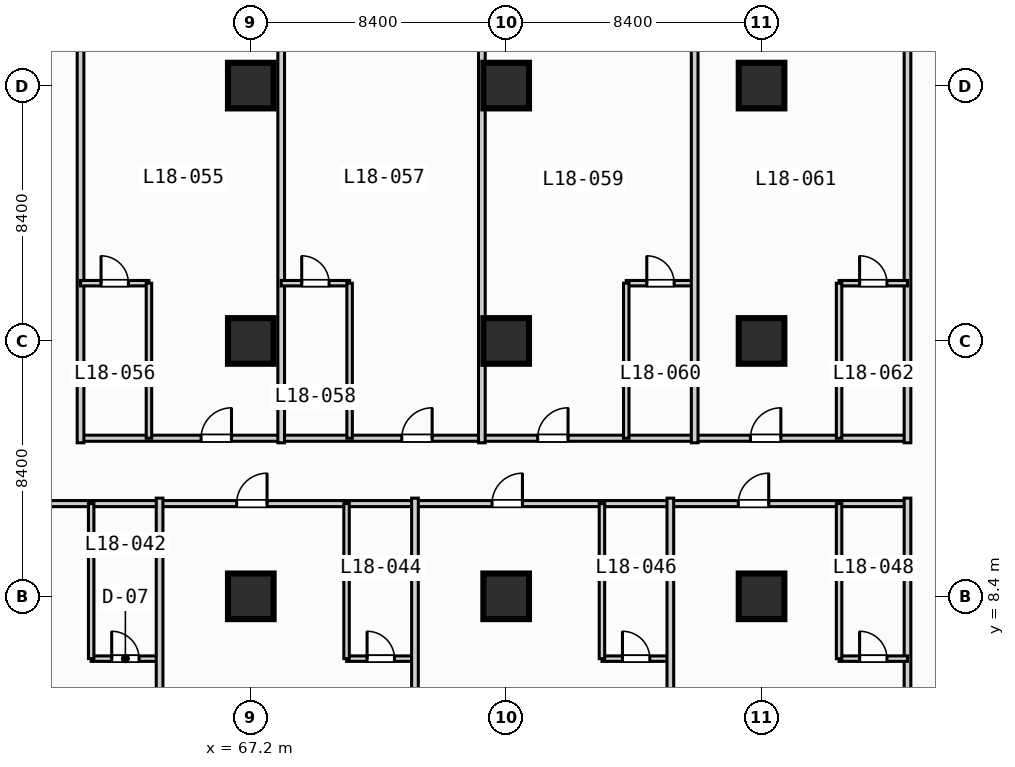
"""IFC4 building model, lengths in metres.
Left out: names, types, materials, properties, quantities, classifications, styles, units other than length and angle.
Written with IfcOpenShell. Run it as: python <this file> out.ifc"""

import sys

from ifc_helpers import new_model, si_unit, direction, frame, frame_2d, origin, origin_2d, place, context, subcontext, project, spatial, rectangle, extrude, element, fill, save


model = new_model("IFC4")
c1 = context("Model", 3, precision=1e-05, world=origin(), true_north=direction((0.0, 1.0)))
c2 = subcontext(c1, "Body", "Model", "MODEL_VIEW")
j1 = project(units=[si_unit("LENGTHUNIT", "METRE"), si_unit("PLANEANGLEUNIT", "RADIAN")], contexts=[c1])
p1 = place(None, origin())
s1 = spatial("IfcSite", under=j1, at=p1, CompositionType="ELEMENT")
p2 = place(p1, origin())
s2 = spatial("IfcBuilding", under=s1, at=p2, CompositionType="ELEMENT")
p3 = place(p2, frame((0.0, 0.0, 77.6)))
s3 = spatial("IfcBuildingStorey", under=s2, at=p3, CompositionType="ELEMENT", Elevation=77.6)
for number, where, z_axis, x_axis in (
    (1, (67.2, 8.4, 0.0), (0.0, 0.0, 1.0), (1.0, 0.0, 0.0)),
    (2, (67.2, 16.8, 0.0), (0.0, 0.0, 1.0), (1.0, 0.0, 0.0)),
    (3, (67.2, 25.2, 0.0), (0.0, 0.0, 1.0), (1.0, 0.0, 0.0)),
    (4, (75.6, 8.4, 0.0), (0.0, 0.0, 1.0), (1.0, 0.0, 0.0)),
    (5, (75.6, 16.8, 0.0), (0.0, 0.0, 1.0), (1.0, 0.0, 0.0)),
    (6, (75.6, 25.2, 0.0), (0.0, 0.0, 1.0), (1.0, 0.0, 0.0)),
    (7, (84.0, 8.4, 0.0), (0.0, 0.0, 1.0), (1.0, 0.0, 0.0)),
    (8, (84.0, 16.8, 0.0), (0.0, 0.0, 1.0), (1.0, 0.0, 0.0)),
    (9, (84.0, 25.2, 0.0), (0.0, 0.0, 1.0), (1.0, 0.0, 0.0)),
):
    element("IfcColumn", number, at=place(p3, frame(where, z_axis=z_axis, x_axis=x_axis)), inside=s3, PredefinedType="COLUMN", context=c2, shape_type="SweptSolid", body=[
        extrude(rectangle(XDim=1.5, YDim=1.5, at=origin_2d()), origin(), (0.0, 0.0, 1.0), 3.8),
    ])
p4 = place(p3, frame((55.8, 11.45, 0.0), z_axis=(0.0, 0.0, 1.0), x_axis=(1.0, 0.0, 0.0)))
e10 = element("IfcWall", 10, at=p4, inside=s3, PredefinedType="PARTITIONING", context=c2, shape_type="SweptSolid", body=[
    extrude(rectangle(XDim=33.0, YDim=0.2, at=frame_2d((16.5, 0.0))), origin(), (0.0, 0.0, 1.0), 3.55),
])
p5 = place(p4, frame((2.535, 0.0, 0.0)))
e11 = element("IfcOpeningElement", 11, at=p5, cuts=e10, PredefinedType="OPENING", context=c2, shape_type="SweptSolid", body=[
    extrude(rectangle(XDim=1.0, YDim=2.15, at=frame_2d((0.5, 1.075))), frame((0.0, 0.11, 0.0), z_axis=(0.0, -1.0, 0.0), x_axis=(1.0, 0.0, 0.0)), (0.0, 0.0, 1.0), 0.22),
])
p6 = place(p4, frame((10.935, 0.0, 0.0)))
e12 = element("IfcOpeningElement", 12, at=p6, cuts=e10, PredefinedType="OPENING", context=c2, shape_type="SweptSolid", body=[
    extrude(rectangle(XDim=1.0, YDim=2.15, at=frame_2d((0.5, 1.075))), frame((0.0, 0.11, 0.0), z_axis=(0.0, -1.0, 0.0), x_axis=(1.0, 0.0, 0.0)), (0.0, 0.0, 1.0), 0.22),
])
p7 = place(p4, frame((19.335, 0.0, 0.0)))
e13 = element("IfcOpeningElement", 13, at=p7, cuts=e10, PredefinedType="OPENING", context=c2, shape_type="SweptSolid", body=[
    extrude(rectangle(XDim=1.0, YDim=2.15, at=frame_2d((0.5, 1.075))), frame((0.0, 0.11, 0.0), z_axis=(0.0, -1.0, 0.0), x_axis=(1.0, 0.0, 0.0)), (0.0, 0.0, 1.0), 0.22),
])
p8 = place(p4, frame((27.435, 0.0, 0.0)))
e14 = element("IfcOpeningElement", 14, at=p8, cuts=e10, PredefinedType="OPENING", context=c2, shape_type="SweptSolid", body=[
    extrude(rectangle(XDim=1.0, YDim=2.15, at=frame_2d((0.5, 1.075))), frame((0.0, 0.11, 0.0), z_axis=(0.0, -1.0, 0.0), x_axis=(1.0, 0.0, 0.0)), (0.0, 0.0, 1.0), 0.22),
])
p9 = place(p3, frame((61.95, 6.35, 0.0), z_axis=(0.0, 0.0, 1.0), x_axis=(1.0, 0.0, 0.0)))
e15 = element("IfcWall", 15, at=p9, inside=s3, PredefinedType="PLUMBINGWALL", context=c2, shape_type="SweptSolid", body=[
    extrude(rectangle(XDim=2.25, YDim=0.18, at=frame_2d((1.125, 0.0))), origin(), (0.0, 0.0, 1.0), 3.55),
])
p10 = place(p9, frame((0.675, 0.0, 0.0)))
e16 = element("IfcOpeningElement", 16, at=p10, cuts=e15, PredefinedType="OPENING", context=c2, shape_type="SweptSolid", body=[
    extrude(rectangle(XDim=0.9, YDim=2.1, at=frame_2d((0.45, 1.05))), frame((0.0, 0.1, 0.0), z_axis=(0.0, -1.0, 0.0), x_axis=(1.0, 0.0, 0.0)), (0.0, 0.0, 1.0), 0.2),
])
p11 = place(p3, frame((61.95, 6.35, 0.0), z_axis=(0.0, 0.0, 1.0), x_axis=(0.0, 1.0, 0.0)))
e17 = element("IfcWall", 17, at=p11, inside=s3, PredefinedType="PLUMBINGWALL", context=c2, shape_type="SweptSolid", body=[
    extrude(rectangle(XDim=5.1, YDim=0.18, at=frame_2d((2.55, 0.0))), origin(), (0.0, 0.0, 1.0), 3.55),
])
p12 = place(p3, frame((64.2, 0.2, 0.0), z_axis=(0.0, 0.0, 1.0), x_axis=(0.0, 1.0, 0.0)))
e18 = element("IfcWall", 18, at=p12, inside=s3, PredefinedType="PARTITIONING", context=c2, shape_type="SweptSolid", body=[
    extrude(rectangle(XDim=11.43, YDim=0.22, at=frame_2d((5.715, 0.0))), origin(), (0.0, 0.0, 1.0), 3.55),
])
p13 = place(p3, frame((70.35, 6.35, 0.0), z_axis=(0.0, 0.0, 1.0), x_axis=(1.0, 0.0, 0.0)))
e19 = element("IfcWall", 19, at=p13, inside=s3, PredefinedType="PLUMBINGWALL", context=c2, shape_type="SweptSolid", body=[
    extrude(rectangle(XDim=2.25, YDim=0.18, at=frame_2d((1.125, 0.0))), origin(), (0.0, 0.0, 1.0), 3.55),
])
p14 = place(p13, frame((0.675, 0.0, 0.0)))
e20 = element("IfcOpeningElement", 20, at=p14, cuts=e19, PredefinedType="OPENING", context=c2, shape_type="SweptSolid", body=[
    extrude(rectangle(XDim=0.9, YDim=2.1, at=frame_2d((0.45, 1.05))), frame((0.0, 0.1, 0.0), z_axis=(0.0, -1.0, 0.0), x_axis=(1.0, 0.0, 0.0)), (0.0, 0.0, 1.0), 0.2),
])
p15 = place(p3, frame((70.35, 6.35, 0.0), z_axis=(0.0, 0.0, 1.0), x_axis=(0.0, 1.0, 0.0)))
e21 = element("IfcWall", 21, at=p15, inside=s3, PredefinedType="PLUMBINGWALL", context=c2, shape_type="SweptSolid", body=[
    extrude(rectangle(XDim=5.1, YDim=0.18, at=frame_2d((2.55, 0.0))), origin(), (0.0, 0.0, 1.0), 3.55),
])
p16 = place(p3, frame((72.6, 0.2, 0.0), z_axis=(0.0, 0.0, 1.0), x_axis=(0.0, 1.0, 0.0)))
e22 = element("IfcWall", 22, at=p16, inside=s3, PredefinedType="PARTITIONING", context=c2, shape_type="SweptSolid", body=[
    extrude(rectangle(XDim=11.43, YDim=0.22, at=frame_2d((5.715, 0.0))), origin(), (0.0, 0.0, 1.0), 3.55),
])
p17 = place(p3, frame((78.75, 6.35, 0.0), z_axis=(0.0, 0.0, 1.0), x_axis=(1.0, 0.0, 0.0)))
e23 = element("IfcWall", 23, at=p17, inside=s3, PredefinedType="PLUMBINGWALL", context=c2, shape_type="SweptSolid", body=[
    extrude(rectangle(XDim=2.25, YDim=0.18, at=frame_2d((1.125, 0.0))), origin(), (0.0, 0.0, 1.0), 3.55),
])
p18 = place(p17, frame((0.675, 0.0, 0.0)))
e24 = element("IfcOpeningElement", 24, at=p18, cuts=e23, PredefinedType="OPENING", context=c2, shape_type="SweptSolid", body=[
    extrude(rectangle(XDim=0.9, YDim=2.1, at=frame_2d((0.45, 1.05))), frame((0.0, 0.1, 0.0), z_axis=(0.0, -1.0, 0.0), x_axis=(1.0, 0.0, 0.0)), (0.0, 0.0, 1.0), 0.2),
])
p19 = place(p3, frame((78.75, 6.35, 0.0), z_axis=(0.0, 0.0, 1.0), x_axis=(0.0, 1.0, 0.0)))
e25 = element("IfcWall", 25, at=p19, inside=s3, PredefinedType="PLUMBINGWALL", context=c2, shape_type="SweptSolid", body=[
    extrude(rectangle(XDim=5.1, YDim=0.18, at=frame_2d((2.55, 0.0))), origin(), (0.0, 0.0, 1.0), 3.55),
])
for number, where, z_axis, x_axis in (
    (26, (81.0, 0.2, 0.0), (0.0, 0.0, 1.0), (0.0, 1.0, 0.0)),
    (27, (88.8, 0.2, 0.0), (0.0, 0.0, 1.0), (0.0, 1.0, 0.0)),
):
    element("IfcWall", number, at=place(p3, frame(where, z_axis=z_axis, x_axis=x_axis)), inside=s3, PredefinedType="PARTITIONING", context=c2, shape_type="SweptSolid", body=[
        extrude(rectangle(XDim=11.43, YDim=0.22, at=frame_2d((5.715, 0.0))), origin(), (0.0, 0.0, 1.0), 3.55),
    ])
p20 = place(p3, frame((86.55, 6.35, 0.0), z_axis=(0.0, 0.0, 1.0), x_axis=(1.0, 0.0, 0.0)))
e28 = element("IfcWall", 28, at=p20, inside=s3, PredefinedType="PLUMBINGWALL", context=c2, shape_type="SweptSolid", body=[
    extrude(rectangle(XDim=2.25, YDim=0.18, at=frame_2d((1.125, 0.0))), origin(), (0.0, 0.0, 1.0), 3.55),
])
p21 = place(p20, frame((0.675, 0.0, 0.0)))
e29 = element("IfcOpeningElement", 29, at=p21, cuts=e28, PredefinedType="OPENING", context=c2, shape_type="SweptSolid", body=[
    extrude(rectangle(XDim=0.9, YDim=2.1, at=frame_2d((0.45, 1.05))), frame((0.0, 0.1, 0.0), z_axis=(0.0, -1.0, 0.0), x_axis=(1.0, 0.0, 0.0)), (0.0, 0.0, 1.0), 0.2),
])
p22 = place(p3, frame((86.55, 6.35, 0.0), z_axis=(0.0, 0.0, 1.0), x_axis=(0.0, 1.0, 0.0)))
e30 = element("IfcWall", 30, at=p22, inside=s3, PredefinedType="PLUMBINGWALL", context=c2, shape_type="SweptSolid", body=[
    extrude(rectangle(XDim=5.1, YDim=0.18, at=frame_2d((2.55, 0.0))), origin(), (0.0, 0.0, 1.0), 3.55),
])
p23 = place(p3, frame((61.6, 13.6, 0.0), z_axis=(0.0, 0.0, 1.0), x_axis=(1.0, 0.0, 0.0)))
e31 = element("IfcWall", 31, at=p23, inside=s3, PredefinedType="PARTITIONING", context=c2, shape_type="SweptSolid", body=[
    extrude(rectangle(XDim=27.2, YDim=0.2, at=frame_2d((13.6, 0.0))), origin(), (0.0, 0.0, 1.0), 3.55),
])
p24 = place(p23, frame((3.965, 0.0, 0.0)))
e32 = element("IfcOpeningElement", 32, at=p24, cuts=e31, PredefinedType="OPENING", context=c2, shape_type="SweptSolid", body=[
    extrude(rectangle(XDim=1.0, YDim=2.15, at=frame_2d((0.5, 1.075))), frame((0.0, 0.11, 0.0), z_axis=(0.0, -1.0, 0.0), x_axis=(1.0, 0.0, 0.0)), (0.0, 0.0, 1.0), 0.22),
])
p25 = place(p23, frame((10.565, 0.0, 0.0)))
e33 = element("IfcOpeningElement", 33, at=p25, cuts=e31, PredefinedType="OPENING", context=c2, shape_type="SweptSolid", body=[
    extrude(rectangle(XDim=1.0, YDim=2.15, at=frame_2d((0.5, 1.075))), frame((0.0, 0.11, 0.0), z_axis=(0.0, -1.0, 0.0), x_axis=(1.0, 0.0, 0.0)), (0.0, 0.0, 1.0), 0.22),
])
p26 = place(p23, frame((15.035, 0.0, 0.0)))
e34 = element("IfcOpeningElement", 34, at=p26, cuts=e31, PredefinedType="OPENING", context=c2, shape_type="SweptSolid", body=[
    extrude(rectangle(XDim=1.0, YDim=2.15, at=frame_2d((0.5, 1.075))), frame((0.0, 0.11, 0.0), z_axis=(0.0, -1.0, 0.0), x_axis=(1.0, 0.0, 0.0)), (0.0, 0.0, 1.0), 0.22),
])
p27 = place(p23, frame((22.035, 0.0, 0.0)))
e35 = element("IfcOpeningElement", 35, at=p27, cuts=e31, PredefinedType="OPENING", context=c2, shape_type="SweptSolid", body=[
    extrude(rectangle(XDim=1.0, YDim=2.15, at=frame_2d((0.5, 1.075))), frame((0.0, 0.11, 0.0), z_axis=(0.0, -1.0, 0.0), x_axis=(1.0, 0.0, 0.0)), (0.0, 0.0, 1.0), 0.22),
])
p28 = place(p3, frame((61.6, 13.45, 0.0), z_axis=(0.0, 0.0, 1.0), x_axis=(0.0, 1.0, 0.0)))
e36 = element("IfcWall", 36, at=p28, inside=s3, PredefinedType="PARTITIONING", context=c2, shape_type="SweptSolid", body=[
    extrude(rectangle(XDim=19.98, YDim=0.22, at=frame_2d((9.99, 0.0))), origin(), (0.0, 0.0, 1.0), 3.55),
])
p29 = place(p3, frame((61.6, 18.7, 0.0), z_axis=(0.0, 0.0, 1.0), x_axis=(1.0, 0.0, 0.0)))
e37 = element("IfcWall", 37, at=p29, inside=s3, PredefinedType="PLUMBINGWALL", context=c2, shape_type="SweptSolid", body=[
    extrude(rectangle(XDim=2.25, YDim=0.18, at=frame_2d((1.125, 0.0))), origin(), (0.0, 0.0, 1.0), 3.55),
])
p30 = place(p29, frame((0.675, 0.0, 0.0)))
e38 = element("IfcOpeningElement", 38, at=p30, cuts=e37, PredefinedType="OPENING", context=c2, shape_type="SweptSolid", body=[
    extrude(rectangle(XDim=0.9, YDim=2.1, at=frame_2d((0.45, 1.05))), frame((0.0, 0.1, 0.0), z_axis=(0.0, -1.0, 0.0), x_axis=(1.0, 0.0, 0.0)), (0.0, 0.0, 1.0), 0.2),
])
p31 = place(p3, frame((63.85, 13.6, 0.0), z_axis=(0.0, 0.0, 1.0), x_axis=(0.0, 1.0, 0.0)))
e39 = element("IfcWall", 39, at=p31, inside=s3, PredefinedType="PLUMBINGWALL", context=c2, shape_type="SweptSolid", body=[
    extrude(rectangle(XDim=5.1, YDim=0.18, at=frame_2d((2.55, 0.0))), origin(), (0.0, 0.0, 1.0), 3.55),
])
p32 = place(p3, frame((68.2, 13.45, 0.0), z_axis=(0.0, 0.0, 1.0), x_axis=(0.0, 1.0, 0.0)))
e40 = element("IfcWall", 40, at=p32, inside=s3, PredefinedType="PARTITIONING", context=c2, shape_type="SweptSolid", body=[
    extrude(rectangle(XDim=19.98, YDim=0.22, at=frame_2d((9.99, 0.0))), origin(), (0.0, 0.0, 1.0), 3.55),
])
p33 = place(p3, frame((68.2, 18.7, 0.0), z_axis=(0.0, 0.0, 1.0), x_axis=(1.0, 0.0, 0.0)))
e41 = element("IfcWall", 41, at=p33, inside=s3, PredefinedType="PLUMBINGWALL", context=c2, shape_type="SweptSolid", body=[
    extrude(rectangle(XDim=2.25, YDim=0.18, at=frame_2d((1.125, 0.0))), origin(), (0.0, 0.0, 1.0), 3.55),
])
p34 = place(p33, frame((0.675, 0.0, 0.0)))
e42 = element("IfcOpeningElement", 42, at=p34, cuts=e41, PredefinedType="OPENING", context=c2, shape_type="SweptSolid", body=[
    extrude(rectangle(XDim=0.9, YDim=2.1, at=frame_2d((0.45, 1.05))), frame((0.0, 0.1, 0.0), z_axis=(0.0, -1.0, 0.0), x_axis=(1.0, 0.0, 0.0)), (0.0, 0.0, 1.0), 0.2),
])
p35 = place(p3, frame((70.45, 13.6, 0.0), z_axis=(0.0, 0.0, 1.0), x_axis=(0.0, 1.0, 0.0)))
e43 = element("IfcWall", 43, at=p35, inside=s3, PredefinedType="PLUMBINGWALL", context=c2, shape_type="SweptSolid", body=[
    extrude(rectangle(XDim=5.1, YDim=0.18, at=frame_2d((2.55, 0.0))), origin(), (0.0, 0.0, 1.0), 3.55),
])
p36 = place(p3, frame((74.8, 13.45, 0.0), z_axis=(0.0, 0.0, 1.0), x_axis=(0.0, 1.0, 0.0)))
e44 = element("IfcWall", 44, at=p36, inside=s3, PredefinedType="PARTITIONING", context=c2, shape_type="SweptSolid", body=[
    extrude(rectangle(XDim=19.98, YDim=0.22, at=frame_2d((9.99, 0.0))), origin(), (0.0, 0.0, 1.0), 3.55),
])
p37 = place(p3, frame((79.55, 18.7, 0.0), z_axis=(0.0, 0.0, 1.0), x_axis=(1.0, 0.0, 0.0)))
e45 = element("IfcWall", 45, at=p37, inside=s3, PredefinedType="PLUMBINGWALL", context=c2, shape_type="SweptSolid", body=[
    extrude(rectangle(XDim=2.25, YDim=0.18, at=frame_2d((1.125, 0.0))), origin(), (0.0, 0.0, 1.0), 3.55),
])
p38 = place(p37, frame((0.675, 0.0, 0.0)))
e46 = element("IfcOpeningElement", 46, at=p38, cuts=e45, PredefinedType="OPENING", context=c2, shape_type="SweptSolid", body=[
    extrude(rectangle(XDim=0.9, YDim=2.1, at=frame_2d((0.45, 1.05))), frame((0.0, 0.1, 0.0), z_axis=(0.0, -1.0, 0.0), x_axis=(1.0, 0.0, 0.0)), (0.0, 0.0, 1.0), 0.2),
])
p39 = place(p3, frame((79.55, 13.6, 0.0), z_axis=(0.0, 0.0, 1.0), x_axis=(0.0, 1.0, 0.0)))
e47 = element("IfcWall", 47, at=p39, inside=s3, PredefinedType="PLUMBINGWALL", context=c2, shape_type="SweptSolid", body=[
    extrude(rectangle(XDim=5.1, YDim=0.18, at=frame_2d((2.55, 0.0))), origin(), (0.0, 0.0, 1.0), 3.55),
])
for number, where, z_axis, x_axis in (
    (48, (81.8, 13.45, 0.0), (0.0, 0.0, 1.0), (0.0, 1.0, 0.0)),
    (49, (88.8, 13.45, 0.0), (0.0, 0.0, 1.0), (0.0, 1.0, 0.0)),
):
    element("IfcWall", number, at=place(p3, frame(where, z_axis=z_axis, x_axis=x_axis)), inside=s3, PredefinedType="PARTITIONING", context=c2, shape_type="SweptSolid", body=[
        extrude(rectangle(XDim=19.98, YDim=0.22, at=frame_2d((9.99, 0.0))), origin(), (0.0, 0.0, 1.0), 3.55),
    ])
p40 = place(p3, frame((86.55, 18.7, 0.0), z_axis=(0.0, 0.0, 1.0), x_axis=(1.0, 0.0, 0.0)))
e50 = element("IfcWall", 50, at=p40, inside=s3, PredefinedType="PLUMBINGWALL", context=c2, shape_type="SweptSolid", body=[
    extrude(rectangle(XDim=2.25, YDim=0.18, at=frame_2d((1.125, 0.0))), origin(), (0.0, 0.0, 1.0), 3.55),
])
p41 = place(p40, frame((0.675, 0.0, 0.0)))
e51 = element("IfcOpeningElement", 51, at=p41, cuts=e50, PredefinedType="OPENING", context=c2, shape_type="SweptSolid", body=[
    extrude(rectangle(XDim=0.9, YDim=2.1, at=frame_2d((0.45, 1.05))), frame((0.0, 0.1, 0.0), z_axis=(0.0, -1.0, 0.0), x_axis=(1.0, 0.0, 0.0)), (0.0, 0.0, 1.0), 0.2),
])
p42 = place(p3, frame((86.55, 13.6, 0.0), z_axis=(0.0, 0.0, 1.0), x_axis=(0.0, 1.0, 0.0)))
e52 = element("IfcWall", 52, at=p42, inside=s3, PredefinedType="PLUMBINGWALL", context=c2, shape_type="SweptSolid", body=[
    extrude(rectangle(XDim=5.1, YDim=0.18, at=frame_2d((2.55, 0.0))), origin(), (0.0, 0.0, 1.0), 3.55),
])
p43 = place(p6, origin())
e53 = element("IfcDoor", 53, at=p43, inside=s3, OperationType="SINGLE_SWING_RIGHT", PredefinedType="DOOR", context=c2, shape_type="SweptSolid", body=[
    extrude(rectangle(XDim=1.0, YDim=2.15, at=frame_2d((0.5, 1.075))), frame((0.0, 0.025, 0.0), z_axis=(0.0, -1.0, 0.0), x_axis=(1.0, 0.0, 0.0)), (0.0, 0.0, 1.0), 0.05),
])
fill(e12, e53)
p44 = place(p7, origin())
e54 = element("IfcDoor", 54, at=p44, inside=s3, OperationType="SINGLE_SWING_RIGHT", PredefinedType="DOOR", context=c2, shape_type="SweptSolid", body=[
    extrude(rectangle(XDim=1.0, YDim=2.15, at=frame_2d((0.5, 1.075))), frame((0.0, 0.025, 0.0), z_axis=(0.0, -1.0, 0.0), x_axis=(1.0, 0.0, 0.0)), (0.0, 0.0, 1.0), 0.05),
])
fill(e13, e54)
p45 = place(p8, origin())
e55 = element("IfcDoor", 55, at=p45, inside=s3, OperationType="SINGLE_SWING_RIGHT", PredefinedType="DOOR", context=c2, shape_type="SweptSolid", body=[
    extrude(rectangle(XDim=1.0, YDim=2.15, at=frame_2d((0.5, 1.075))), frame((0.0, 0.025, 0.0), z_axis=(0.0, -1.0, 0.0), x_axis=(1.0, 0.0, 0.0)), (0.0, 0.0, 1.0), 0.05),
])
fill(e14, e55)
p46 = place(p10, origin())
e56 = element("IfcDoor", 56, at=p46, inside=s3, OperationType="SINGLE_SWING_LEFT", PredefinedType="DOOR", context=c2, shape_type="SweptSolid", body=[
    extrude(rectangle(XDim=0.9, YDim=2.1, at=frame_2d((0.45, 1.05))), frame((0.0, 0.025, 0.0), z_axis=(0.0, -1.0, 0.0), x_axis=(1.0, 0.0, 0.0)), (0.0, 0.0, 1.0), 0.05),
])
fill(e16, e56)
p47 = place(p14, origin())
e57 = element("IfcDoor", 57, at=p47, inside=s3, OperationType="SINGLE_SWING_LEFT", PredefinedType="DOOR", context=c2, shape_type="SweptSolid", body=[
    extrude(rectangle(XDim=0.9, YDim=2.1, at=frame_2d((0.45, 1.05))), frame((0.0, 0.025, 0.0), z_axis=(0.0, -1.0, 0.0), x_axis=(1.0, 0.0, 0.0)), (0.0, 0.0, 1.0), 0.05),
])
fill(e20, e57)
p48 = place(p18, origin())
e58 = element("IfcDoor", 58, at=p48, inside=s3, OperationType="SINGLE_SWING_LEFT", PredefinedType="DOOR", context=c2, shape_type="SweptSolid", body=[
    extrude(rectangle(XDim=0.9, YDim=2.1, at=frame_2d((0.45, 1.05))), frame((0.0, 0.025, 0.0), z_axis=(0.0, -1.0, 0.0), x_axis=(1.0, 0.0, 0.0)), (0.0, 0.0, 1.0), 0.05),
])
fill(e24, e58)
p49 = place(p21, origin())
e59 = element("IfcDoor", 59, at=p49, inside=s3, OperationType="SINGLE_SWING_LEFT", PredefinedType="DOOR", context=c2, shape_type="SweptSolid", body=[
    extrude(rectangle(XDim=0.9, YDim=2.1, at=frame_2d((0.45, 1.05))), frame((0.0, 0.025, 0.0), z_axis=(0.0, -1.0, 0.0), x_axis=(1.0, 0.0, 0.0)), (0.0, 0.0, 1.0), 0.05),
])
fill(e29, e59)
p50 = place(p24, origin())
e60 = element("IfcDoor", 60, at=p50, inside=s3, OperationType="SINGLE_SWING_RIGHT", PredefinedType="DOOR", context=c2, shape_type="SweptSolid", body=[
    extrude(rectangle(XDim=1.0, YDim=2.15, at=frame_2d((0.5, 1.075))), frame((0.0, 0.025, 0.0), z_axis=(0.0, -1.0, 0.0), x_axis=(1.0, 0.0, 0.0)), (0.0, 0.0, 1.0), 0.05),
])
fill(e32, e60)
p51 = place(p25, origin())
e61 = element("IfcDoor", 61, at=p51, inside=s3, OperationType="SINGLE_SWING_RIGHT", PredefinedType="DOOR", context=c2, shape_type="SweptSolid", body=[
    extrude(rectangle(XDim=1.0, YDim=2.15, at=frame_2d((0.5, 1.075))), frame((0.0, 0.025, 0.0), z_axis=(0.0, -1.0, 0.0), x_axis=(1.0, 0.0, 0.0)), (0.0, 0.0, 1.0), 0.05),
])
fill(e33, e61)
p52 = place(p26, origin())
e62 = element("IfcDoor", 62, at=p52, inside=s3, OperationType="SINGLE_SWING_RIGHT", PredefinedType="DOOR", context=c2, shape_type="SweptSolid", body=[
    extrude(rectangle(XDim=1.0, YDim=2.15, at=frame_2d((0.5, 1.075))), frame((0.0, 0.025, 0.0), z_axis=(0.0, -1.0, 0.0), x_axis=(1.0, 0.0, 0.0)), (0.0, 0.0, 1.0), 0.05),
])
fill(e34, e62)
p53 = place(p27, origin())
e63 = element("IfcDoor", 63, at=p53, inside=s3, OperationType="SINGLE_SWING_RIGHT", PredefinedType="DOOR", context=c2, shape_type="SweptSolid", body=[
    extrude(rectangle(XDim=1.0, YDim=2.15, at=frame_2d((0.5, 1.075))), frame((0.0, 0.025, 0.0), z_axis=(0.0, -1.0, 0.0), x_axis=(1.0, 0.0, 0.0)), (0.0, 0.0, 1.0), 0.05),
])
fill(e35, e63)
p54 = place(p30, origin())
e64 = element("IfcDoor", 64, at=p54, inside=s3, OperationType="SINGLE_SWING_LEFT", PredefinedType="DOOR", context=c2, shape_type="SweptSolid", body=[
    extrude(rectangle(XDim=0.9, YDim=2.1, at=frame_2d((0.45, 1.05))), frame((0.0, 0.025, 0.0), z_axis=(0.0, -1.0, 0.0), x_axis=(1.0, 0.0, 0.0)), (0.0, 0.0, 1.0), 0.05),
])
fill(e38, e64)
p55 = place(p34, origin())
e65 = element("IfcDoor", 65, at=p55, inside=s3, OperationType="SINGLE_SWING_LEFT", PredefinedType="DOOR", context=c2, shape_type="SweptSolid", body=[
    extrude(rectangle(XDim=0.9, YDim=2.1, at=frame_2d((0.45, 1.05))), frame((0.0, 0.025, 0.0), z_axis=(0.0, -1.0, 0.0), x_axis=(1.0, 0.0, 0.0)), (0.0, 0.0, 1.0), 0.05),
])
fill(e42, e65)
p56 = place(p38, origin())
e66 = element("IfcDoor", 66, at=p56, inside=s3, OperationType="SINGLE_SWING_LEFT", PredefinedType="DOOR", context=c2, shape_type="SweptSolid", body=[
    extrude(rectangle(XDim=0.9, YDim=2.1, at=frame_2d((0.45, 1.05))), frame((0.0, 0.025, 0.0), z_axis=(0.0, -1.0, 0.0), x_axis=(1.0, 0.0, 0.0)), (0.0, 0.0, 1.0), 0.05),
])
fill(e46, e66)
p57 = place(p41, origin())
e67 = element("IfcDoor", 67, at=p57, inside=s3, OperationType="SINGLE_SWING_LEFT", PredefinedType="DOOR", context=c2, shape_type="SweptSolid", body=[
    extrude(rectangle(XDim=0.9, YDim=2.1, at=frame_2d((0.45, 1.05))), frame((0.0, 0.025, 0.0), z_axis=(0.0, -1.0, 0.0), x_axis=(1.0, 0.0, 0.0)), (0.0, 0.0, 1.0), 0.05),
])
fill(e51, e67)
save(model, sys.argv[1])
